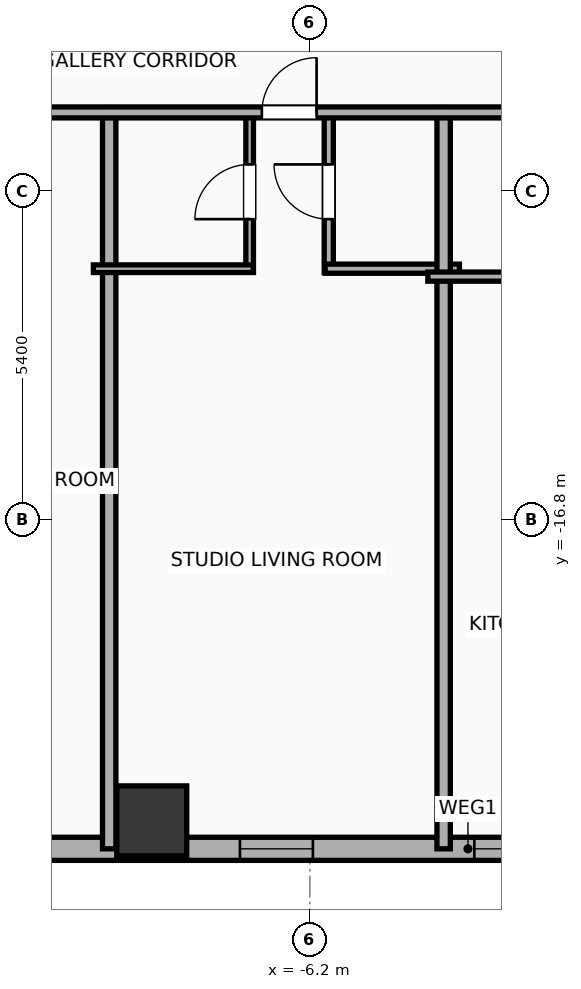
"""IFC4 building model, lengths in metres.
Left out: names, types, materials, properties, quantities, classifications, styles, units other than length and angle.
Written with IfcOpenShell. Run it as: python <this file> out.ifc"""

import sys

from ifc_helpers import new_model, si_unit, direction, frame, frame_2d, origin, origin_2d, place, context, subcontext, project, spatial, rectangle, hollow_rectangle, extrude, element, fill, save


model = new_model("IFC4")
c1 = context("Model", 3, precision=1e-05, world=origin(), true_north=direction((0.0, 1.0)))
c2 = subcontext(c1, "Body", "Model", "MODEL_VIEW")
j1 = project(units=[si_unit("LENGTHUNIT", "METRE"), si_unit("PLANEANGLEUNIT", "RADIAN")], contexts=[c1])
p1 = place(None, origin())
s1 = spatial("IfcSite", under=j1, at=p1, CompositionType="ELEMENT")
p2 = place(p1, origin())
s2 = spatial("IfcBuilding", under=s1, at=p2, CompositionType="ELEMENT")
p3 = place(p2, frame((0.0, 0.0, 68.9)))
s3 = spatial("IfcBuildingStorey", under=s2, at=p3, CompositionType="ELEMENT", Elevation=68.9)
p4 = place(p3, frame((-8.8, -21.75, 0.0), z_axis=(0.0, 0.0, 1.0), x_axis=(1.0, 0.0, 0.0)))
e1 = element("IfcColumn", 1, at=p4, inside=s3, PredefinedType="COLUMN", context=c2, shape_type="SweptSolid", body=[
    extrude(hollow_rectangle(XDim=1.15, YDim=1.15, WallThickness=0.04, at=origin_2d()), origin(), (0.0, 0.0, 1.0), 3.9),
])
p5 = place(p3, frame((22.381, -22.21, 0.0), z_axis=(0.0, 0.0, 1.0), x_axis=(-1.0, 0.0, 0.0)))
e2 = element("IfcWall", 2, at=p5, inside=s3, PredefinedType="ELEMENTEDWALL", context=c2, shape_type="SweptSolid", body=[
    extrude(rectangle(XDim=51.963, YDim=0.38, at=frame_2d((25.981, 0.0))), origin(), (0.0, 0.0, 1.0), 3.65),
])
p6 = place(p5, frame((49.127, 0.0, 0.75)))
e3 = element("IfcOpeningElement", 3, at=p6, cuts=e2, PredefinedType="OPENING", context=c2, shape_type="SweptSolid", body=[
    extrude(rectangle(XDim=1.2, YDim=2.05, at=frame_2d((0.6, 1.025))), frame((0.0, 0.2, 0.0), z_axis=(0.0, -1.0, 0.0), x_axis=(1.0, 0.0, 0.0)), (0.0, 0.0, 1.0), 0.4),
])
p7 = place(p5, frame((43.926, 0.0, 0.75)))
e4 = element("IfcOpeningElement", 4, at=p7, cuts=e2, PredefinedType="OPENING", context=c2, shape_type="SweptSolid", body=[
    extrude(rectangle(XDim=1.2, YDim=2.05, at=frame_2d((0.6, 1.025))), frame((0.0, 0.2, 0.0), z_axis=(0.0, -1.0, 0.0), x_axis=(1.0, 0.0, 0.0)), (0.0, 0.0, 1.0), 0.4),
])
p8 = place(p5, frame((46.676, 0.0, 0.75)))
e5 = element("IfcOpeningElement", 5, at=p8, cuts=e2, PredefinedType="OPENING", context=c2, shape_type="SweptSolid", body=[
    extrude(rectangle(XDim=1.2, YDim=2.05, at=frame_2d((0.6, 1.025))), frame((0.0, 0.2, 0.0), z_axis=(0.0, -1.0, 0.0), x_axis=(1.0, 0.0, 0.0)), (0.0, 0.0, 1.0), 0.4),
])
p9 = place(p5, frame((39.531, 0.0, 0.75)))
e6 = element("IfcOpeningElement", 6, at=p9, cuts=e2, PredefinedType="OPENING", context=c2, shape_type="SweptSolid", body=[
    extrude(rectangle(XDim=1.2, YDim=2.05, at=frame_2d((0.6, 1.025))), frame((0.0, 0.2, 0.0), z_axis=(0.0, -1.0, 0.0), x_axis=(1.0, 0.0, 0.0)), (0.0, 0.0, 1.0), 0.4),
])
p10 = place(p5, frame((32.926, 0.0, 0.75)))
e7 = element("IfcOpeningElement", 7, at=p10, cuts=e2, PredefinedType="OPENING", context=c2, shape_type="SweptSolid", body=[
    extrude(rectangle(XDim=1.2, YDim=2.05, at=frame_2d((0.6, 1.025))), frame((0.0, 0.2, 0.0), z_axis=(0.0, -1.0, 0.0), x_axis=(1.0, 0.0, 0.0)), (0.0, 0.0, 1.0), 0.4),
])
p11 = place(p5, frame((35.676, 0.0, 0.75)))
e8 = element("IfcOpeningElement", 8, at=p11, cuts=e2, PredefinedType="OPENING", context=c2, shape_type="SweptSolid", body=[
    extrude(rectangle(XDim=1.2, YDim=2.05, at=frame_2d((0.6, 1.025))), frame((0.0, 0.2, 0.0), z_axis=(0.0, -1.0, 0.0), x_axis=(1.0, 0.0, 0.0)), (0.0, 0.0, 1.0), 0.4),
])
p12 = place(p5, frame((28.531, 0.0, 0.75)))
e9 = element("IfcOpeningElement", 9, at=p12, cuts=e2, PredefinedType="OPENING", context=c2, shape_type="SweptSolid", body=[
    extrude(rectangle(XDim=1.2, YDim=2.05, at=frame_2d((0.6, 1.025))), frame((0.0, 0.2, 0.0), z_axis=(0.0, -1.0, 0.0), x_axis=(1.0, 0.0, 0.0)), (0.0, 0.0, 1.0), 0.4),
])
p13 = place(p5, frame((21.926, 0.0, 0.75)))
e10 = element("IfcOpeningElement", 10, at=p13, cuts=e2, PredefinedType="OPENING", context=c2, shape_type="SweptSolid", body=[
    extrude(rectangle(XDim=1.2, YDim=2.05, at=frame_2d((0.6, 1.025))), frame((0.0, 0.2, 0.0), z_axis=(0.0, -1.0, 0.0), x_axis=(1.0, 0.0, 0.0)), (0.0, 0.0, 1.0), 0.4),
])
p14 = place(p5, frame((24.676, 0.0, 0.75)))
e11 = element("IfcOpeningElement", 11, at=p14, cuts=e2, PredefinedType="OPENING", context=c2, shape_type="SweptSolid", body=[
    extrude(rectangle(XDim=1.2, YDim=2.05, at=frame_2d((0.6, 1.025))), frame((0.0, 0.2, 0.0), z_axis=(0.0, -1.0, 0.0), x_axis=(1.0, 0.0, 0.0)), (0.0, 0.0, 1.0), 0.4),
])
p15 = place(p5, frame((18.636, 0.0, 0.75)))
e12 = element("IfcOpeningElement", 12, at=p15, cuts=e2, PredefinedType="OPENING", context=c2, shape_type="SweptSolid", body=[
    extrude(rectangle(XDim=1.2, YDim=2.05, at=frame_2d((0.6, 1.025))), frame((0.0, 0.2, 0.0), z_axis=(0.0, -1.0, 0.0), x_axis=(1.0, 0.0, 0.0)), (0.0, 0.0, 1.0), 0.4),
])
p16 = place(p5, frame((15.886, 0.0, 0.75)))
e13 = element("IfcOpeningElement", 13, at=p16, cuts=e2, PredefinedType="OPENING", context=c2, shape_type="SweptSolid", body=[
    extrude(rectangle(XDim=1.2, YDim=2.05, at=frame_2d((0.6, 1.025))), frame((0.0, 0.2, 0.0), z_axis=(0.0, -1.0, 0.0), x_axis=(1.0, 0.0, 0.0)), (0.0, 0.0, 1.0), 0.4),
])
p17 = place(p5, frame((12.031, 0.0, 0.75)))
e14 = element("IfcOpeningElement", 14, at=p17, cuts=e2, PredefinedType="OPENING", context=c2, shape_type="SweptSolid", body=[
    extrude(rectangle(XDim=1.2, YDim=2.05, at=frame_2d((0.6, 1.025))), frame((0.0, 0.2, 0.0), z_axis=(0.0, -1.0, 0.0), x_axis=(1.0, 0.0, 0.0)), (0.0, 0.0, 1.0), 0.4),
])
p18 = place(p5, frame((7.636, 0.0, 0.75)))
e15 = element("IfcOpeningElement", 15, at=p18, cuts=e2, PredefinedType="OPENING", context=c2, shape_type="SweptSolid", body=[
    extrude(rectangle(XDim=1.2, YDim=2.05, at=frame_2d((0.6, 1.025))), frame((0.0, 0.2, 0.0), z_axis=(0.0, -1.0, 0.0), x_axis=(1.0, 0.0, 0.0)), (0.0, 0.0, 1.0), 0.4),
])
p19 = place(p5, frame((4.886, 0.0, 0.75)))
e16 = element("IfcOpeningElement", 16, at=p19, cuts=e2, PredefinedType="OPENING", context=c2, shape_type="SweptSolid", body=[
    extrude(rectangle(XDim=1.2, YDim=2.05, at=frame_2d((0.6, 1.025))), frame((0.0, 0.2, 0.0), z_axis=(0.0, -1.0, 0.0), x_axis=(1.0, 0.0, 0.0)), (0.0, 0.0, 1.0), 0.4),
])
p20 = place(p5, frame((2.036, 0.0, 0.75)))
e17 = element("IfcOpeningElement", 17, at=p20, cuts=e2, PredefinedType="OPENING", context=c2, shape_type="SweptSolid", body=[
    extrude(rectangle(XDim=1.2, YDim=2.05, at=frame_2d((0.6, 1.025))), frame((0.0, 0.2, 0.0), z_axis=(0.0, -1.0, 0.0), x_axis=(1.0, 0.0, 0.0)), (0.0, 0.0, 1.0), 0.4),
])
p21 = place(p3, frame((-9.5, -22.21, 0.0), z_axis=(0.0, 0.0, 1.0), x_axis=(0.0, 1.0, 0.0)))
e18 = element("IfcWall", 18, at=p21, inside=s3, PredefinedType="PARTITIONING", context=c2, shape_type="SweptSolid", body=[
    extrude(rectangle(XDim=12.19, YDim=0.22, at=frame_2d((6.095, 0.0))), origin(), (0.0, 0.0, 1.0), 2.94),
])
p22 = place(p3, frame((-7.19, -12.73, 0.0), z_axis=(0.0, 0.0, 1.0), x_axis=(0.0, 1.0, 0.0)))
e19 = element("IfcWall", 19, at=p22, inside=s3, PredefinedType="PARTITIONING", context=c2, shape_type="SweptSolid", body=[
    extrude(rectangle(XDim=2.65, YDim=0.125, at=frame_2d((1.325, 0.0))), origin(), (0.0, 0.0, 1.0), 3.65),
])
p23 = place(p22, frame((0.875, 0.0, 0.0)))
e20 = element("IfcOpeningElement", 20, at=p23, cuts=e19, PredefinedType="OPENING", context=c2, shape_type="SweptSolid", body=[
    extrude(rectangle(XDim=0.9, YDim=2.05, at=frame_2d((0.45, 1.025))), frame((0.0, 0.073, 0.0), z_axis=(0.0, -1.0, 0.0), x_axis=(1.0, 0.0, 0.0)), (0.0, 0.0, 1.0), 0.145),
])
p24 = place(p3, frame((-5.889, -12.73, 0.0), z_axis=(0.0, 0.0, 1.0), x_axis=(0.0, 1.0, 0.0)))
e21 = element("IfcWall", 21, at=p24, inside=s3, PredefinedType="PLUMBINGWALL", context=c2, shape_type="SweptSolid", body=[
    extrude(rectangle(XDim=2.65, YDim=0.15, at=frame_2d((1.325, 0.0))), origin(), (0.0, 0.0, 1.0), 3.65),
])
p25 = place(p24, frame((0.875, 0.0, 0.0)))
e22 = element("IfcOpeningElement", 22, at=p25, cuts=e21, PredefinedType="OPENING", context=c2, shape_type="SweptSolid", body=[
    extrude(rectangle(XDim=0.9, YDim=2.05, at=frame_2d((0.45, 1.025))), frame((0.0, 0.085, 0.0), z_axis=(0.0, -1.0, 0.0), x_axis=(1.0, 0.0, 0.0)), (0.0, 0.0, 1.0), 0.17),
])
p26 = place(p3, frame((-9.76, -12.67, 0.0), z_axis=(0.0, 0.0, 1.0), x_axis=(1.0, 0.0, 0.0)))
e23 = element("IfcWall", 23, at=p26, inside=s3, PredefinedType="PARTITIONING", context=c2, shape_type="SweptSolid", body=[
    extrude(rectangle(XDim=2.63, YDim=0.125, at=frame_2d((1.315, 0.0))), origin(), (0.0, 0.0, 1.0), 3.65),
])
p27 = place(p3, frame((-5.949, -12.67, 0.0), z_axis=(0.0, 0.0, 1.0), x_axis=(1.0, 0.0, 0.0)))
e24 = element("IfcWall", 24, at=p27, inside=s3, PredefinedType="PLUMBINGWALL", context=c2, shape_type="SweptSolid", body=[
    extrude(rectangle(XDim=2.209, YDim=0.15, at=frame_2d((1.104, 0.0))), origin(), (0.0, 0.0, 1.0), 3.65),
])
p28 = place(p3, frame((-4.0, -22.21, 0.0), z_axis=(0.0, 0.0, 1.0), x_axis=(0.0, 1.0, 0.0)))
e25 = element("IfcWall", 25, at=p28, inside=s3, PredefinedType="PARTITIONING", context=c2, shape_type="SweptSolid", body=[
    extrude(rectangle(XDim=12.19, YDim=0.22, at=frame_2d((6.095, 0.0))), origin(), (0.0, 0.0, 1.0), 3.65),
])
p29 = place(p3, frame((-4.26, -12.8, 0.0), z_axis=(0.0, 0.0, 1.0), x_axis=(1.0, 0.0, 0.0)))
e26 = element("IfcWall", 26, at=p29, inside=s3, PredefinedType="PLUMBINGWALL", context=c2, shape_type="SweptSolid", body=[
    extrude(rectangle(XDim=2.55, YDim=0.15, at=frame_2d((1.275, 0.0))), origin(), (0.0, 0.0, 1.0), 3.65),
])
p30 = place(p3, frame((-33.41, -10.1, 0.0), z_axis=(0.0, 0.0, 1.0), x_axis=(1.0, 0.0, 0.0)))
e27 = element("IfcWall", 27, at=p30, inside=s3, PredefinedType="PARTITIONING", context=c2, shape_type="SweptSolid", body=[
    extrude(rectangle(XDim=59.62, YDim=0.18, at=frame_2d((29.81, 0.0))), origin(), (0.0, 0.0, 1.0), 3.65),
])
p31 = place(p30, frame((3.259, 0.0, 0.0)))
e28 = element("IfcOpeningElement", 28, at=p31, cuts=e27, PredefinedType="OPENING", context=c2, shape_type="SweptSolid", body=[
    extrude(rectangle(XDim=1.15, YDim=2.05, at=frame_2d((0.575, 1.025))), frame((0.0, 0.1, 0.0), z_axis=(0.0, -1.0, 0.0), x_axis=(1.0, 0.0, 0.0)), (0.0, 0.0, 1.0), 0.2),
])
p32 = place(p30, frame((10.657, 0.0, 0.0)))
e29 = element("IfcOpeningElement", 29, at=p32, cuts=e27, PredefinedType="OPENING", context=c2, shape_type="SweptSolid", body=[
    extrude(rectangle(XDim=1.15, YDim=2.05, at=frame_2d((0.575, 1.025))), frame((0.0, 0.1, 0.0), z_axis=(0.0, -1.0, 0.0), x_axis=(1.0, 0.0, 0.0)), (0.0, 0.0, 1.0), 0.2),
])
p33 = place(p30, frame((15.421, 0.0, 0.0)))
e30 = element("IfcOpeningElement", 30, at=p33, cuts=e27, PredefinedType="OPENING", context=c2, shape_type="SweptSolid", body=[
    extrude(rectangle(XDim=0.9, YDim=2.05, at=frame_2d((0.45, 1.025))), frame((0.0, 0.1, 0.0), z_axis=(0.0, -1.0, 0.0), x_axis=(1.0, 0.0, 0.0)), (0.0, 0.0, 1.0), 0.2),
])
p34 = place(p30, frame((21.657, 0.0, 0.0)))
e31 = element("IfcOpeningElement", 31, at=p34, cuts=e27, PredefinedType="OPENING", context=c2, shape_type="SweptSolid", body=[
    extrude(rectangle(XDim=1.15, YDim=2.05, at=frame_2d((0.575, 1.025))), frame((0.0, 0.1, 0.0), z_axis=(0.0, -1.0, 0.0), x_axis=(1.0, 0.0, 0.0)), (0.0, 0.0, 1.0), 0.2),
])
p35 = place(p30, frame((26.421, 0.0, 0.0)))
e32 = element("IfcOpeningElement", 32, at=p35, cuts=e27, PredefinedType="OPENING", context=c2, shape_type="SweptSolid", body=[
    extrude(rectangle(XDim=0.9, YDim=2.05, at=frame_2d((0.45, 1.025))), frame((0.0, 0.1, 0.0), z_axis=(0.0, -1.0, 0.0), x_axis=(1.0, 0.0, 0.0)), (0.0, 0.0, 1.0), 0.2),
])
p36 = place(p30, frame((32.657, 0.0, 0.0)))
e33 = element("IfcOpeningElement", 33, at=p36, cuts=e27, PredefinedType="OPENING", context=c2, shape_type="SweptSolid", body=[
    extrude(rectangle(XDim=1.15, YDim=2.05, at=frame_2d((0.575, 1.025))), frame((0.0, 0.1, 0.0), z_axis=(0.0, -1.0, 0.0), x_axis=(1.0, 0.0, 0.0)), (0.0, 0.0, 1.0), 0.2),
])
p37 = place(p30, frame((36.008, 0.0, 0.0)))
e34 = element("IfcOpeningElement", 34, at=p37, cuts=e27, PredefinedType="OPENING", context=c2, shape_type="SweptSolid", body=[
    extrude(rectangle(XDim=1.15, YDim=2.05, at=frame_2d((0.575, 1.025))), frame((0.0, 0.1, 0.0), z_axis=(0.0, -1.0, 0.0), x_axis=(1.0, 0.0, 0.0)), (0.0, 0.0, 1.0), 0.2),
])
p38 = place(p30, frame((42.917, 0.0, 0.0)))
e35 = element("IfcOpeningElement", 35, at=p38, cuts=e27, PredefinedType="OPENING", context=c2, shape_type="SweptSolid", body=[
    extrude(rectangle(XDim=0.9, YDim=2.05, at=frame_2d((0.45, 1.025))), frame((0.0, 0.1, 0.0), z_axis=(0.0, -1.0, 0.0), x_axis=(1.0, 0.0, 0.0)), (0.0, 0.0, 1.0), 0.2),
])
p39 = place(p30, frame((47.008, 0.0, 0.0)))
e36 = element("IfcOpeningElement", 36, at=p39, cuts=e27, PredefinedType="OPENING", context=c2, shape_type="SweptSolid", body=[
    extrude(rectangle(XDim=1.15, YDim=2.05, at=frame_2d((0.575, 1.025))), frame((0.0, 0.1, 0.0), z_axis=(0.0, -1.0, 0.0), x_axis=(1.0, 0.0, 0.0)), (0.0, 0.0, 1.0), 0.2),
])
p40 = place(p30, frame((55.14, 0.0, 0.0)))
e37 = element("IfcOpeningElement", 37, at=p40, cuts=e27, PredefinedType="OPENING", context=c2, shape_type="SweptSolid", body=[
    extrude(rectangle(XDim=1.15, YDim=2.05, at=frame_2d((0.575, 1.025))), frame((0.0, 0.1, 0.0), z_axis=(0.0, -1.0, 0.0), x_axis=(1.0, 0.0, 0.0)), (0.0, 0.0, 1.0), 0.2),
])
p41 = place(p12, origin())
e38 = element("IfcWindow", 38, at=p41, inside=s3, PartitioningType="SINGLE_PANEL", PredefinedType="WINDOW", context=c2, shape_type="SweptSolid", body=[
    extrude(rectangle(XDim=1.2, YDim=2.05, at=frame_2d((0.6, 1.025))), frame((0.0, 0.03, 0.0), z_axis=(0.0, -1.0, 0.0), x_axis=(1.0, 0.0, 0.0)), (0.0, 0.0, 1.0), 0.06),
])
fill(e9, e38)
p42 = place(p14, origin())
e39 = element("IfcWindow", 39, at=p42, inside=s3, PartitioningType="SINGLE_PANEL", PredefinedType="WINDOW", context=c2, shape_type="SweptSolid", body=[
    extrude(rectangle(XDim=1.2, YDim=2.05, at=frame_2d((0.6, 1.025))), frame((0.0, 0.03, 0.0), z_axis=(0.0, -1.0, 0.0), x_axis=(1.0, 0.0, 0.0)), (0.0, 0.0, 1.0), 0.06),
])
fill(e11, e39)
p43 = place(p23, origin())
e40 = element("IfcDoor", 40, at=p43, inside=s3, OperationType="SINGLE_SWING_LEFT", PredefinedType="DOOR", context=c2, shape_type="SweptSolid", body=[
    extrude(rectangle(XDim=0.9, YDim=2.05, at=frame_2d((0.45, 1.025))), frame((0.0, 0.025, 0.0), z_axis=(0.0, -1.0, 0.0), x_axis=(1.0, 0.0, 0.0)), (0.0, 0.0, 1.0), 0.05),
])
fill(e20, e40)
p44 = place(p25, origin())
e41 = element("IfcDoor", 41, at=p44, inside=s3, OperationType="SINGLE_SWING_RIGHT", PredefinedType="DOOR", context=c2, shape_type="SweptSolid", body=[
    extrude(rectangle(XDim=0.9, YDim=2.05, at=frame_2d((0.45, 1.025))), frame((0.0, 0.025, 0.0), z_axis=(0.0, -1.0, 0.0), x_axis=(1.0, 0.0, 0.0)), (0.0, 0.0, 1.0), 0.05),
])
fill(e22, e41)
p45 = place(p35, origin())
e42 = element("IfcDoor", 42, at=p45, inside=s3, OperationType="SINGLE_SWING_RIGHT", PredefinedType="DOOR", context=c2, shape_type="SweptSolid", body=[
    extrude(rectangle(XDim=0.9, YDim=2.05, at=frame_2d((0.45, 1.025))), frame((0.0, 0.025, 0.0), z_axis=(0.0, -1.0, 0.0), x_axis=(1.0, 0.0, 0.0)), (0.0, 0.0, 1.0), 0.05),
])
fill(e32, e42)
save(model, sys.argv[1])
